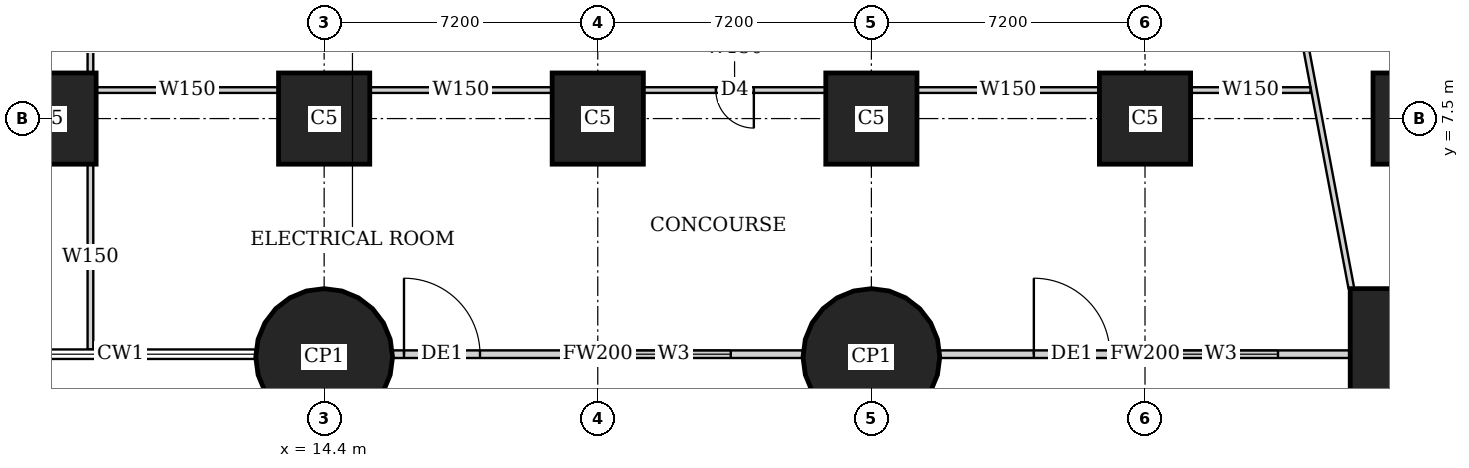
"""IFC4 building model, lengths in metres.
Left out: names, types, materials, properties, quantities, classifications, styles, units other than length and angle.
Written with IfcOpenShell. Run it as: python <this file> out.ifc"""

import sys

from ifc_helpers import new_model, si_unit, direction, frame, frame_2d, origin, origin_2d, place, context, subcontext, project, spatial, rectangle, circle, extrude, element, fill, save


model = new_model("IFC4")
c1 = context("Model", 3, precision=1e-05, world=origin(), true_north=direction((0.0, 1.0)))
c2 = subcontext(c1, "Body", "Model", "MODEL_VIEW")
j1 = project(units=[si_unit("LENGTHUNIT", "METRE"), si_unit("PLANEANGLEUNIT", "RADIAN")], contexts=[c1])
p1 = place(None, origin())
s1 = spatial("IfcSite", under=j1, at=p1, CompositionType="ELEMENT")
p2 = place(p1, origin())
s2 = spatial("IfcBuilding", under=s1, at=p2, CompositionType="ELEMENT")
p3 = place(p2, origin())
s3 = spatial("IfcBuildingStorey", under=s2, at=p3, CompositionType="ELEMENT", Elevation=0.0)
for number, where, z_axis, x_axis in (
    (1, (14.4, 1.225, 0.0), (0.0, 0.0, 1.0), (1.0, 0.0, 0.0)),
    (2, (28.8, 1.225, 0.0), (0.0, 0.0, 1.0), (1.0, 0.0, 0.0)),
):
    element("IfcColumn", number, at=place(p3, frame(where, z_axis=z_axis, x_axis=x_axis)), inside=s3, PredefinedType="COLUMN", context=c2, shape_type="SweptSolid", body=[
        extrude(circle(Radius=1.8, at=origin_2d()), origin(), (0.0, 0.0, 1.0), 5.6),
    ])
p4 = place(p3, frame((43.2, 1.225, 0.0), z_axis=(0.0, 0.0, 1.0), x_axis=(1.0, 0.0, 0.0)))
e3 = element("IfcColumn", 3, at=p4, inside=s3, PredefinedType="COLUMN", context=c2, shape_type="SweptSolid", body=[
    extrude(rectangle(XDim=3.6, YDim=3.6, at=origin_2d()), origin(), (0.0, 0.0, 1.0), 5.6),
])
for number, where, z_axis, x_axis in (
    (4, (7.2, 7.5, 0.0), (0.0, 0.0, 1.0), (1.0, 0.0, 0.0)),
    (5, (14.4, 7.5, 0.0), (0.0, 0.0, 1.0), (1.0, 0.0, 0.0)),
    (6, (21.6, 7.5, 0.0), (0.0, 0.0, 1.0), (1.0, 0.0, 0.0)),
    (7, (28.8, 7.5, 0.0), (0.0, 0.0, 1.0), (1.0, 0.0, 0.0)),
    (8, (36.0, 7.5, 0.0), (0.0, 0.0, 1.0), (1.0, 0.0, 0.0)),
    (9, (43.2, 7.5, 0.0), (0.0, 0.0, 1.0), (1.0, 0.0, 0.0)),
):
    element("IfcColumn", number, at=place(p3, frame(where, z_axis=z_axis, x_axis=x_axis)), inside=s3, PredefinedType="COLUMN", context=c2, shape_type="SweptSolid", body=[
        extrude(rectangle(XDim=2.4, YDim=2.4, at=origin_2d()), origin(), (0.0, 0.0, 1.0), 5.6),
    ])
p5 = place(p3, frame((16.201, 1.3, 0.0), z_axis=(0.0, 0.0, 1.0), x_axis=(1.0, 0.0, 0.0)))
e10 = element("IfcWall", 10, at=p5, inside=s3, PredefinedType="SOLIDWALL", context=c2, shape_type="SweptSolid", body=[
    extrude(rectangle(XDim=10.798, YDim=0.2, at=frame_2d((5.399, 0.0))), origin(), (0.0, 0.0, 1.0), 3.5),
])
p6 = place(p5, frame((0.3, 0.0, 0.0)))
e11 = element("IfcOpeningElement", 11, at=p6, cuts=e10, PredefinedType="OPENING", context=c2, shape_type="SweptSolid", body=[
    extrude(rectangle(XDim=2.0, YDim=2.4, at=frame_2d((1.0, 1.2))), frame((0.0, 0.11, 0.0), z_axis=(0.0, -1.0, 0.0), x_axis=(1.0, 0.0, 0.0)), (0.0, 0.0, 1.0), 0.22),
])
p7 = place(p5, frame((5.899, 0.0, 0.3)))
e12 = element("IfcOpeningElement", 12, at=p7, cuts=e10, PredefinedType="OPENING", context=c2, shape_type="SweptSolid", body=[
    extrude(rectangle(XDim=3.0, YDim=3.1, at=frame_2d((1.5, 1.55))), frame((0.0, 0.11, 0.0), z_axis=(0.0, -1.0, 0.0), x_axis=(1.0, 0.0, 0.0)), (0.0, 0.0, 1.0), 0.22),
])
p8 = place(p3, frame((30.601, 1.3, 0.0), z_axis=(0.0, 0.0, 1.0), x_axis=(1.0, 0.0, 0.0)))
e13 = element("IfcWall", 13, at=p8, inside=s3, PredefinedType="SOLIDWALL", context=c2, shape_type="SweptSolid", body=[
    extrude(rectangle(XDim=10.798, YDim=0.2, at=frame_2d((5.399, 0.0))), origin(), (0.0, 0.0, 1.0), 3.5),
])
p9 = place(p8, frame((2.474, 0.0, 0.0)))
e14 = element("IfcOpeningElement", 14, at=p9, cuts=e13, PredefinedType="OPENING", context=c2, shape_type="SweptSolid", body=[
    extrude(rectangle(XDim=2.0, YDim=2.4, at=frame_2d((1.0, 1.2))), frame((0.0, 0.11, 0.0), z_axis=(0.0, -1.0, 0.0), x_axis=(1.0, 0.0, 0.0)), (0.0, 0.0, 1.0), 0.22),
])
p10 = place(p8, frame((5.899, 0.0, 0.3)))
e15 = element("IfcOpeningElement", 15, at=p10, cuts=e13, PredefinedType="OPENING", context=c2, shape_type="SweptSolid", body=[
    extrude(rectangle(XDim=3.0, YDim=3.1, at=frame_2d((1.5, 1.55))), frame((0.0, 0.11, 0.0), z_axis=(0.0, -1.0, 0.0), x_axis=(1.0, 0.0, 0.0)), (0.0, 0.0, 1.0), 0.22),
])
p11 = place(p3, frame((8.25, 1.425, 0.0), z_axis=(0.0, 0.0, 1.0), x_axis=(0.0, 1.0, 0.0)))
e16 = element("IfcWall", 16, at=p11, inside=s3, PredefinedType="SOLIDWALL", context=c2, shape_type="SweptSolid", body=[
    extrude(rectangle(XDim=4.874, YDim=0.15, at=frame_2d((2.437, 0.0))), origin(), (0.0, 0.0, 1.0), 3.5),
])
p12 = place(p3, frame((8.25, 8.701, 0.0), z_axis=(0.0, 0.0, 1.0), x_axis=(0.0, 1.0, 0.0)))
e17 = element("IfcWall", 17, at=p12, inside=s3, PredefinedType="SOLIDWALL", context=c2, shape_type="SweptSolid", body=[
    extrude(rectangle(XDim=5.098, YDim=0.15, at=frame_2d((2.549, 0.0))), origin(), (0.0, 0.0, 1.0), 5.3),
])
p13 = place(p12, frame((1.624, 0.0, 0.0)))
e18 = element("IfcOpeningElement", 18, at=p13, cuts=e17, PredefinedType="OPENING", context=c2, shape_type="SweptSolid", body=[
    extrude(rectangle(XDim=1.0, YDim=2.1, at=frame_2d((0.5, 1.05))), frame((0.0, 0.085, 0.0), z_axis=(0.0, -1.0, 0.0), x_axis=(1.0, 0.0, 0.0)), (0.0, 0.0, 1.0), 0.17),
])
p14 = place(p3, frame((40.355, 8.25, 0.0), z_axis=(0.0, 0.0, 1.0), x_axis=(-1.0, 0.0, 0.0)))
e19 = element("IfcWall", 19, at=p14, inside=s3, PredefinedType="SOLIDWALL", context=c2, shape_type="SweptSolid", body=[
    extrude(rectangle(XDim=3.154, YDim=0.15, at=frame_2d((1.577, 0.0))), origin(), (0.0, 0.0, 1.0), 3.7),
])
p15 = place(p3, frame((34.799, 8.25, 0.0), z_axis=(0.0, 0.0, 1.0), x_axis=(-1.0, 0.0, 0.0)))
e20 = element("IfcWall", 20, at=p15, inside=s3, PredefinedType="SOLIDWALL", context=c2, shape_type="SweptSolid", body=[
    extrude(rectangle(XDim=4.798, YDim=0.15, at=frame_2d((2.399, 0.0))), origin(), (0.0, 0.0, 1.0), 3.7),
])
p16 = place(p3, frame((27.599, 8.25, 0.0), z_axis=(0.0, 0.0, 1.0), x_axis=(-1.0, 0.0, 0.0)))
e21 = element("IfcWall", 21, at=p16, inside=s3, PredefinedType="SOLIDWALL", context=c2, shape_type="SweptSolid", body=[
    extrude(rectangle(XDim=4.798, YDim=0.15, at=frame_2d((2.399, 0.0))), origin(), (0.0, 0.0, 1.0), 3.7),
])
p17 = place(p16, frame((1.892, 0.0, 0.0)))
e22 = element("IfcOpeningElement", 22, at=p17, cuts=e21, PredefinedType="OPENING", context=c2, shape_type="SweptSolid", body=[
    extrude(rectangle(XDim=1.0, YDim=2.1, at=frame_2d((0.5, 1.05))), frame((0.0, 0.085, 0.0), z_axis=(0.0, -1.0, 0.0), x_axis=(1.0, 0.0, 0.0)), (0.0, 0.0, 1.0), 0.17),
])
p18 = place(p3, frame((20.399, 8.25, 0.0), z_axis=(0.0, 0.0, 1.0), x_axis=(-1.0, 0.0, 0.0)))
e23 = element("IfcWall", 23, at=p18, inside=s3, PredefinedType="SOLIDWALL", context=c2, shape_type="SweptSolid", body=[
    extrude(rectangle(XDim=4.798, YDim=0.15, at=frame_2d((2.399, 0.0))), origin(), (0.0, 0.0, 1.0), 3.7),
])
p19 = place(p3, frame((13.199, 8.25, 0.0), z_axis=(0.0, 0.0, 1.0), x_axis=(-1.0, 0.0, 0.0)))
e24 = element("IfcWall", 24, at=p19, inside=s3, PredefinedType="SOLIDWALL", context=c2, shape_type="SweptSolid", body=[
    extrude(rectangle(XDim=4.798, YDim=0.15, at=frame_2d((2.399, 0.0))), origin(), (0.0, 0.0, 1.0), 3.7),
])
p20 = place(p3, frame((35.151, 36.285, 0.0), z_axis=(0.0, 0.0, 1.0), x_axis=(0.185575970071, -0.982629919823, 0.0)))
e25 = element("IfcWall", 25, at=p20, inside=s3, PredefinedType="SOLIDWALL", context=c2, shape_type="SweptSolid", body=[
    extrude(rectangle(XDim=33.841, YDim=0.15, at=frame_2d((16.92, 0.0))), origin(), (0.0, 0.0, 1.0), 3.7),
])
p21 = place(p20, frame((0.25, 0.0, 0.0)))
e26 = element("IfcOpeningElement", 26, at=p21, cuts=e25, PredefinedType="OPENING", context=c2, shape_type="SweptSolid", body=[
    extrude(rectangle(XDim=1.8, YDim=2.1, at=frame_2d((0.9, 1.05))), frame((0.0, 0.085, 0.0), z_axis=(0.0, -1.0, 0.0), x_axis=(1.0, 0.0, 0.0)), (0.0, 0.0, 1.0), 0.17),
])
p22 = place(p20, frame((24.261, 0.0, 0.0)))
e27 = element("IfcOpeningElement", 27, at=p22, cuts=e25, PredefinedType="OPENING", context=c2, shape_type="SweptSolid", body=[
    extrude(rectangle(XDim=1.8, YDim=2.1, at=frame_2d((0.9, 1.05))), frame((0.0, 0.085, 0.0), z_axis=(0.0, -1.0, 0.0), x_axis=(1.0, 0.0, 0.0)), (0.0, 0.0, 1.0), 0.17),
])
p23 = place(p6, origin())
e28 = element("IfcDoor", 28, at=p23, inside=s3, OperationType="DOUBLE_DOOR_SINGLE_SWING", PredefinedType="DOOR", context=c2, shape_type="SweptSolid", body=[
    extrude(rectangle(XDim=2.0, YDim=2.4, at=frame_2d((1.0, 1.2))), frame((0.0, 0.025, 0.0), z_axis=(0.0, -1.0, 0.0), x_axis=(1.0, 0.0, 0.0)), (0.0, 0.0, 1.0), 0.05),
])
fill(e11, e28)
p24 = place(p7, origin())
e29 = element("IfcWindow", 29, at=p24, inside=s3, PartitioningType="SINGLE_PANEL", PredefinedType="WINDOW", context=c2, shape_type="SweptSolid", body=[
    extrude(rectangle(XDim=3.0, YDim=3.1, at=frame_2d((1.5, 1.55))), frame((0.0, 0.03, 0.0), z_axis=(0.0, -1.0, 0.0), x_axis=(1.0, 0.0, 0.0)), (0.0, 0.0, 1.0), 0.06),
])
fill(e12, e29)
p25 = place(p9, origin())
e30 = element("IfcDoor", 30, at=p25, inside=s3, OperationType="DOUBLE_DOOR_SINGLE_SWING", PredefinedType="DOOR", context=c2, shape_type="SweptSolid", body=[
    extrude(rectangle(XDim=2.0, YDim=2.4, at=frame_2d((1.0, 1.2))), frame((0.0, 0.025, 0.0), z_axis=(0.0, -1.0, 0.0), x_axis=(1.0, 0.0, 0.0)), (0.0, 0.0, 1.0), 0.05),
])
fill(e14, e30)
p26 = place(p10, origin())
e31 = element("IfcWindow", 31, at=p26, inside=s3, PartitioningType="SINGLE_PANEL", PredefinedType="WINDOW", context=c2, shape_type="SweptSolid", body=[
    extrude(rectangle(XDim=3.0, YDim=3.1, at=frame_2d((1.5, 1.55))), frame((0.0, 0.03, 0.0), z_axis=(0.0, -1.0, 0.0), x_axis=(1.0, 0.0, 0.0)), (0.0, 0.0, 1.0), 0.06),
])
fill(e15, e31)
p27 = place(p17, origin())
e32 = element("IfcDoor", 32, at=p27, inside=s3, OperationType="SINGLE_SWING_LEFT", PredefinedType="DOOR", context=c2, shape_type="SweptSolid", body=[
    extrude(rectangle(XDim=1.0, YDim=2.1, at=frame_2d((0.5, 1.05))), frame((0.0, 0.025, 0.0), z_axis=(0.0, -1.0, 0.0), x_axis=(1.0, 0.0, 0.0)), (0.0, 0.0, 1.0), 0.05),
])
fill(e22, e32)
save(model, sys.argv[1])
